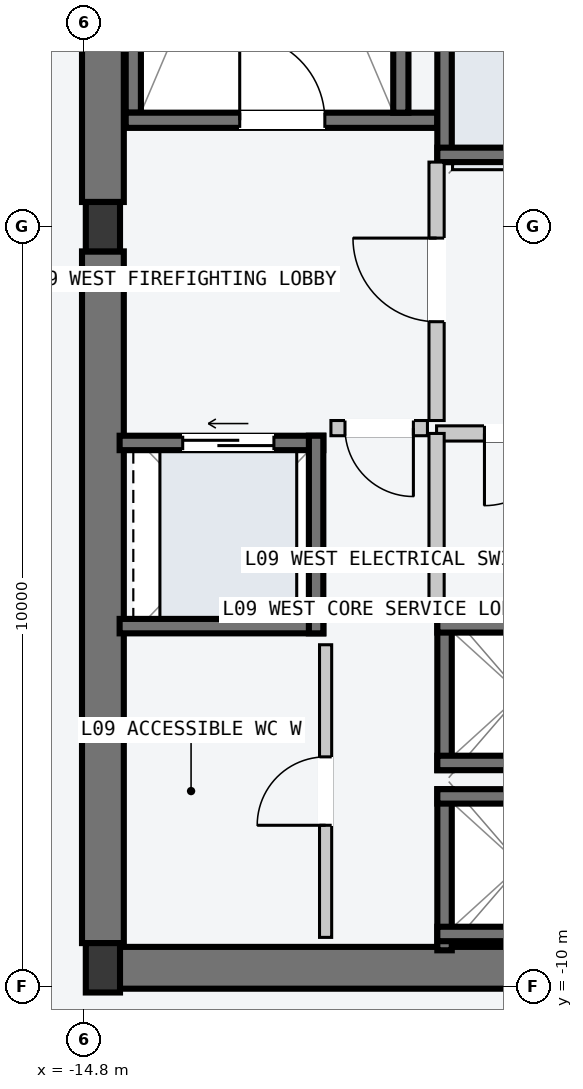
"""IFC4 building model, lengths in metres.
Left out: names, types, materials, properties, quantities, classifications, styles, units other than length and angle.
Written with IfcOpenShell. Run it as: python <this file> out.ifc"""

import sys

from ifc_helpers import new_model, si_unit, direction, frame, frame_2d, origin, origin_2d, place, context, subcontext, project, spatial, rectangle, i_section, extrude, element, fill, save


model = new_model("IFC4")
c1 = context("Model", 3, precision=1e-05, world=origin(), true_north=direction((0.0, 1.0)))
c2 = subcontext(c1, "Body", "Model", "MODEL_VIEW")
j1 = project(units=[si_unit("LENGTHUNIT", "METRE"), si_unit("PLANEANGLEUNIT", "RADIAN")], contexts=[c1])
p1 = place(None, origin())
s1 = spatial("IfcSite", under=j1, at=p1, CompositionType="ELEMENT")
p2 = place(p1, origin())
s2 = spatial("IfcBuilding", under=s1, at=p2, CompositionType="ELEMENT")
p3 = place(p2, frame((0.0, 0.0, 38.4)))
s3 = spatial("IfcBuildingStorey", under=s2, at=p3, CompositionType="ELEMENT", Elevation=38.4)
p4 = place(p3, frame((-14.53, -9.75, -0.2), z_axis=(0.0, 0.0, 1.0), x_axis=(1.0, 0.0, 0.0)))
e1 = element("IfcWall", 1, at=p4, inside=s3, PredefinedType="SHEAR", context=c2, shape_type="SweptSolid", body=[
    extrude(rectangle(XDim=6.46, YDim=0.55, at=frame_2d((3.23, 0.0))), origin(), (0.0, 0.0, 1.0), 3.6),
])
for number, where, z_axis, x_axis in (
    (2, (-14.55, -9.425, -0.2), (0.0, 0.0, 1.0), (0.0, 1.0, 0.0)),
    (3, (-14.55, 0.325, -0.2), (0.0, 0.0, 1.0), (0.0, 1.0, 0.0)),
):
    element("IfcWall", number, at=place(p3, frame(where, z_axis=z_axis, x_axis=x_axis)), inside=s3, PredefinedType="SHEAR", context=c2, shape_type="SweptSolid", body=[
        extrude(rectangle(XDim=9.1, YDim=0.55, at=frame_2d((4.55, 0.0))), origin(), (0.0, 0.0, 1.0), 3.6),
    ])
p5 = place(p3, frame((-14.15, 1.5, -0.2), z_axis=(0.0, 0.0, 1.0), x_axis=(0.0, 1.0, 0.0)))
e4 = element("IfcWall", 4, at=p5, inside=s3, PredefinedType="SOLIDWALL", context=c2, shape_type="SweptSolid", body=[
    extrude(rectangle(XDim=7.8, YDim=0.2, at=frame_2d((3.9, 0.0))), origin(), (0.0, 0.0, 1.0), 3.6),
])
p6 = place(p3, frame((-14.25, 1.4, -0.2), z_axis=(0.0, 0.0, 1.0), x_axis=(1.0, 0.0, 0.0)))
e5 = element("IfcWall", 5, at=p6, inside=s3, PredefinedType="SOLIDWALL", context=c2, shape_type="SweptSolid", body=[
    extrude(rectangle(XDim=4.1, YDim=0.2, at=frame_2d((2.05, 0.0))), origin(), (0.0, 0.0, 1.0), 3.6),
])
p7 = place(p6, frame((1.5, 0.0, 0.2)))
e6 = element("IfcOpeningElement", 6, at=p7, cuts=e5, PredefinedType="OPENING", context=c2, shape_type="SweptSolid", body=[
    extrude(rectangle(XDim=1.12, YDim=2.18, at=frame_2d((0.56, 1.09))), frame((0.0, 0.11, 0.0), z_axis=(0.0, -1.0, 0.0), x_axis=(1.0, 0.0, 0.0)), (0.0, 0.0, 1.0), 0.22),
])
p8 = place(p3, frame((-10.63, 1.5, -0.2), z_axis=(0.0, 0.0, 1.0), x_axis=(0.0, 1.0, 0.0)))
e7 = element("IfcWall", 7, at=p8, inside=s3, PredefinedType="SOLIDWALL", context=c2, shape_type="SweptSolid", body=[
    extrude(rectangle(XDim=7.8, YDim=0.2, at=frame_2d((3.9, 0.0))), origin(), (0.0, 0.0, 1.0), 3.6),
])
for number, where, z_axis, x_axis in (
    (8, (-14.55, -9.75, 0.0), (0.0, 0.0, 1.0), (1.0, 0.0, 0.0)),
    (9, (-14.55, 0.0, 0.0), (0.0, 0.0, 1.0), (1.0, 0.0, 0.0)),
):
    element("IfcColumn", number, at=place(p3, frame(where, z_axis=z_axis, x_axis=x_axis)), inside=s3, PredefinedType="COLUMN", context=c2, shape_type="SweptSolid", body=[
        extrude(i_section(OverallWidth=0.45, OverallDepth=0.65, WebThickness=0.025, FlangeThickness=0.04, at=origin_2d()), origin(), (0.0, 0.0, 1.0), 3.6),
    ])
p9 = place(p3, frame((-10.055, 0.85, -0.2), z_axis=(0.0, 0.0, 1.0), x_axis=(0.0, 1.0, 0.0)))
e10 = element("IfcWall", 10, at=p9, inside=s3, PredefinedType="SOLIDWALL", context=c2, shape_type="SweptSolid", body=[
    extrude(rectangle(XDim=1.9, YDim=0.19, at=frame_2d((0.95, 0.0))), origin(), (0.0, 0.0, 1.0), 3.6),
])
p10 = place(p3, frame((-10.15, 0.945, -0.2), z_axis=(0.0, 0.0, 1.0), x_axis=(1.0, 0.0, 0.0)))
e11 = element("IfcWall", 11, at=p10, inside=s3, PredefinedType="SOLIDWALL", context=c2, shape_type="SweptSolid", body=[
    extrude(rectangle(XDim=2.2, YDim=0.19, at=frame_2d((1.1, 0.0))), origin(), (0.0, 0.0, 1.0), 3.6),
])
p11 = place(p3, frame((-10.055, -9.52, -0.2), z_axis=(0.0, 0.0, 1.0), x_axis=(0.0, 1.0, 0.0)))
e12 = element("IfcWall", 12, at=p11, inside=s3, PredefinedType="SOLIDWALL", context=c2, shape_type="SweptSolid", body=[
    extrude(rectangle(XDim=2.12, YDim=0.19, at=frame_2d((1.06, 0.0))), origin(), (0.0, 0.0, 1.0), 3.6),
])
for number, where, z_axis, x_axis in (
    (13, (-10.15, -7.495, -0.2), (0.0, 0.0, 1.0), (1.0, 0.0, 0.0)),
    (14, (-10.15, -9.305, -0.2), (0.0, 0.0, 1.0), (1.0, 0.0, 0.0)),
):
    element("IfcWall", number, at=place(p3, frame(where, z_axis=z_axis, x_axis=x_axis)), inside=s3, PredefinedType="SOLIDWALL", context=c2, shape_type="SweptSolid", body=[
        extrude(rectangle(XDim=2.2, YDim=0.19, at=frame_2d((1.1, 0.0))), origin(), (0.0, 0.0, 1.0), 3.6),
    ])
p12 = place(p3, frame((-10.055, -7.15, -0.2), z_axis=(0.0, 0.0, 1.0), x_axis=(0.0, 1.0, 0.0)))
e15 = element("IfcWall", 15, at=p12, inside=s3, PredefinedType="SOLIDWALL", context=c2, shape_type="SweptSolid", body=[
    extrude(rectangle(XDim=2.0, YDim=0.19, at=frame_2d((1.0, 0.0))), origin(), (0.0, 0.0, 1.0), 3.6),
])
for number, where, z_axis, x_axis in (
    (16, (-10.15, -5.245, -0.2), (0.0, 0.0, 1.0), (1.0, 0.0, 0.0)),
    (17, (-10.15, -7.055, -0.2), (0.0, 0.0, 1.0), (1.0, 0.0, 0.0)),
):
    element("IfcWall", number, at=place(p3, frame(where, z_axis=z_axis, x_axis=x_axis)), inside=s3, PredefinedType="SOLIDWALL", context=c2, shape_type="SweptSolid", body=[
        extrude(rectangle(XDim=2.2, YDim=0.19, at=frame_2d((1.1, 0.0))), origin(), (0.0, 0.0, 1.0), 3.6),
    ])
p13 = place(p3, frame((-14.33, -2.845, -0.2), z_axis=(0.0, 0.0, 1.0), x_axis=(1.0, 0.0, 0.0)))
e18 = element("IfcWall", 18, at=p13, inside=s3, PredefinedType="SOLIDWALL", context=c2, shape_type="SweptSolid", body=[
    extrude(rectangle(XDim=2.68, YDim=0.19, at=frame_2d((1.34, 0.0))), origin(), (0.0, 0.0, 1.0), 3.6),
])
p14 = place(p13, frame((0.83, 0.0, 0.2)))
e19 = element("IfcOpeningElement", 19, at=p14, cuts=e18, PredefinedType="OPENING", context=c2, shape_type="SweptSolid", body=[
    extrude(rectangle(XDim=1.2, YDim=2.2, at=frame_2d((0.6, 1.1))), frame((0.0, 0.105, 0.0), z_axis=(0.0, -1.0, 0.0), x_axis=(1.0, 0.0, 0.0)), (0.0, 0.0, 1.0), 0.21),
])
p15 = place(p3, frame((-14.33, -5.255, -0.2), z_axis=(0.0, 0.0, 1.0), x_axis=(1.0, 0.0, 0.0)))
e20 = element("IfcWall", 20, at=p15, inside=s3, PredefinedType="SOLIDWALL", context=c2, shape_type="SweptSolid", body=[
    extrude(rectangle(XDim=2.68, YDim=0.19, at=frame_2d((1.34, 0.0))), origin(), (0.0, 0.0, 1.0), 3.6),
])
p16 = place(p3, frame((-11.745, -5.35, -0.2), z_axis=(0.0, 0.0, 1.0), x_axis=(0.0, 1.0, 0.0)))
e21 = element("IfcWall", 21, at=p16, inside=s3, PredefinedType="SOLIDWALL", context=c2, shape_type="SweptSolid", body=[
    extrude(rectangle(XDim=2.6, YDim=0.19, at=frame_2d((1.3, 0.0))), origin(), (0.0, 0.0, 1.0), 3.6),
])
p17 = place(p3, frame((-10.16, -2.55, 0.0), z_axis=(0.0, 0.0, 1.0), x_axis=(0.0, 1.0, 0.0)))
e22 = element("IfcWall", 22, at=p17, inside=s3, PredefinedType="PARTITIONING", context=c2, shape_type="SweptSolid", body=[
    extrude(rectangle(XDim=3.4, YDim=0.2, at=frame_2d((1.7, 0.0))), origin(), (0.0, 0.0, 1.0), 3.4),
])
p18 = place(p17, frame((1.3, 0.0, 0.0)))
e23 = element("IfcOpeningElement", 23, at=p18, cuts=e22, PredefinedType="OPENING", context=c2, shape_type="SweptSolid", body=[
    extrude(rectangle(XDim=1.1, YDim=2.15, at=frame_2d((0.55, 1.075))), frame((0.0, 0.11, 0.0), z_axis=(0.0, -1.0, 0.0), x_axis=(1.0, 0.0, 0.0)), (0.0, 0.0, 1.0), 0.22),
])
p19 = place(p3, frame((-10.28, -2.65, 0.0), z_axis=(0.0, 0.0, 1.0), x_axis=(-1.0, 0.0, 0.0)))
e24 = element("IfcWall", 24, at=p19, inside=s3, PredefinedType="PARTITIONING", context=c2, shape_type="SweptSolid", body=[
    extrude(rectangle(XDim=1.27, YDim=0.2, at=frame_2d((0.635, 0.0))), origin(), (0.0, 0.0, 1.0), 3.4),
])
p20 = place(p19, frame((0.185, 0.0, 0.0)))
e25 = element("IfcOpeningElement", 25, at=p20, cuts=e24, PredefinedType="OPENING", context=c2, shape_type="SweptSolid", body=[
    extrude(rectangle(XDim=0.9, YDim=2.15, at=frame_2d((0.45, 1.075))), frame((0.0, 0.11, 0.0), z_axis=(0.0, -1.0, 0.0), x_axis=(1.0, 0.0, 0.0)), (0.0, 0.0, 1.0), 0.22),
])
p21 = place(p3, frame((-7.96, -2.72, 0.0), z_axis=(0.0, 0.0, 1.0), x_axis=(-1.0, 0.0, 0.0)))
e26 = element("IfcWall", 26, at=p21, inside=s3, PredefinedType="PARTITIONING", context=c2, shape_type="SweptSolid", body=[
    extrude(rectangle(XDim=2.2, YDim=0.2, at=frame_2d((1.1, 0.0))), origin(), (0.0, 0.0, 1.0), 3.4),
])
p22 = place(p21, frame((0.62, 0.0, 0.0)))
e27 = element("IfcOpeningElement", 27, at=p22, cuts=e26, PredefinedType="OPENING", context=c2, shape_type="SweptSolid", body=[
    extrude(rectangle(XDim=0.95, YDim=2.1, at=frame_2d((0.475, 1.05))), frame((0.0, 0.11, 0.0), z_axis=(0.0, -1.0, 0.0), x_axis=(1.0, 0.0, 0.0)), (0.0, 0.0, 1.0), 0.22),
])
p23 = place(p3, frame((-10.16, -5.16, 0.0), z_axis=(0.0, 0.0, 1.0), x_axis=(0.0, 1.0, 0.0)))
e28 = element("IfcWall", 28, at=p23, inside=s3, PredefinedType="PARTITIONING", context=c2, shape_type="SweptSolid", body=[
    extrude(rectangle(XDim=2.44, YDim=0.2, at=frame_2d((1.22, 0.0))), origin(), (0.0, 0.0, 1.0), 3.4),
])
p24 = place(p3, frame((-11.62, -9.35, 0.0), z_axis=(0.0, 0.0, 1.0), x_axis=(0.0, 1.0, 0.0)))
e29 = element("IfcWall", 29, at=p24, inside=s3, PredefinedType="PARTITIONING", context=c2, shape_type="SweptSolid", body=[
    extrude(rectangle(XDim=3.85, YDim=0.16, at=frame_2d((1.925, 0.0))), origin(), (0.0, 0.0, 1.0), 3.4),
])
p25 = place(p24, frame((1.475, 0.0, 0.0)))
e30 = element("IfcOpeningElement", 30, at=p25, cuts=e29, PredefinedType="OPENING", context=c2, shape_type="SweptSolid", body=[
    extrude(rectangle(XDim=0.9, YDim=2.15, at=frame_2d((0.45, 1.075))), frame((0.0, 0.09, 0.0), z_axis=(0.0, -1.0, 0.0), x_axis=(1.0, 0.0, 0.0)), (0.0, 0.0, 1.0), 0.18),
])
p26 = place(p7, origin())
e31 = element("IfcDoor", 31, at=p26, inside=s3, OperationType="SINGLE_SWING_LEFT", PredefinedType="DOOR", context=c2, shape_type="SweptSolid", body=[
    extrude(rectangle(XDim=1.12, YDim=2.18, at=frame_2d((0.56, 1.09))), frame((0.0, 0.025, 0.0), z_axis=(0.0, -1.0, 0.0), x_axis=(1.0, 0.0, 0.0)), (0.0, 0.0, 1.0), 0.05),
])
fill(e6, e31)
p27 = place(p14, origin())
e32 = element("IfcDoor", 32, at=p27, inside=s3, OperationType="SLIDING_TO_LEFT", PredefinedType="DOOR", context=c2, shape_type="SweptSolid", body=[
    extrude(rectangle(XDim=1.2, YDim=2.2, at=frame_2d((0.6, 1.1))), frame((0.0, 0.025, 0.0), z_axis=(0.0, -1.0, 0.0), x_axis=(1.0, 0.0, 0.0)), (0.0, 0.0, 1.0), 0.05),
])
fill(e19, e32)
p28 = place(p18, origin())
e33 = element("IfcDoor", 33, at=p28, inside=s3, OperationType="SINGLE_SWING_RIGHT", PredefinedType="DOOR", context=c2, shape_type="SweptSolid", body=[
    extrude(rectangle(XDim=1.1, YDim=2.15, at=frame_2d((0.55, 1.075))), frame((0.0, 0.025, 0.0), z_axis=(0.0, -1.0, 0.0), x_axis=(1.0, 0.0, 0.0)), (0.0, 0.0, 1.0), 0.05),
])
fill(e23, e33)
p29 = place(p20, origin())
e34 = element("IfcDoor", 34, at=p29, inside=s3, OperationType="SINGLE_SWING_LEFT", PredefinedType="DOOR", context=c2, shape_type="SweptSolid", body=[
    extrude(rectangle(XDim=0.9, YDim=2.15, at=frame_2d((0.45, 1.075))), frame((0.0, 0.025, 0.0), z_axis=(0.0, -1.0, 0.0), x_axis=(1.0, 0.0, 0.0)), (0.0, 0.0, 1.0), 0.05),
])
fill(e25, e34)
p30 = place(p22, origin())
e35 = element("IfcDoor", 35, at=p30, inside=s3, OperationType="SINGLE_SWING_RIGHT", PredefinedType="DOOR", context=c2, shape_type="SweptSolid", body=[
    extrude(rectangle(XDim=0.95, YDim=2.1, at=frame_2d((0.475, 1.05))), frame((0.0, 0.025, 0.0), z_axis=(0.0, -1.0, 0.0), x_axis=(1.0, 0.0, 0.0)), (0.0, 0.0, 1.0), 0.05),
])
fill(e27, e35)
p31 = place(p25, origin())
e36 = element("IfcDoor", 36, at=p31, inside=s3, OperationType="SINGLE_SWING_LEFT", PredefinedType="DOOR", context=c2, shape_type="SweptSolid", body=[
    extrude(rectangle(XDim=0.9, YDim=2.15, at=frame_2d((0.45, 1.075))), frame((0.0, 0.025, 0.0), z_axis=(0.0, -1.0, 0.0), x_axis=(1.0, 0.0, 0.0)), (0.0, 0.0, 1.0), 0.05),
])
fill(e30, e36)
save(model, sys.argv[1])
